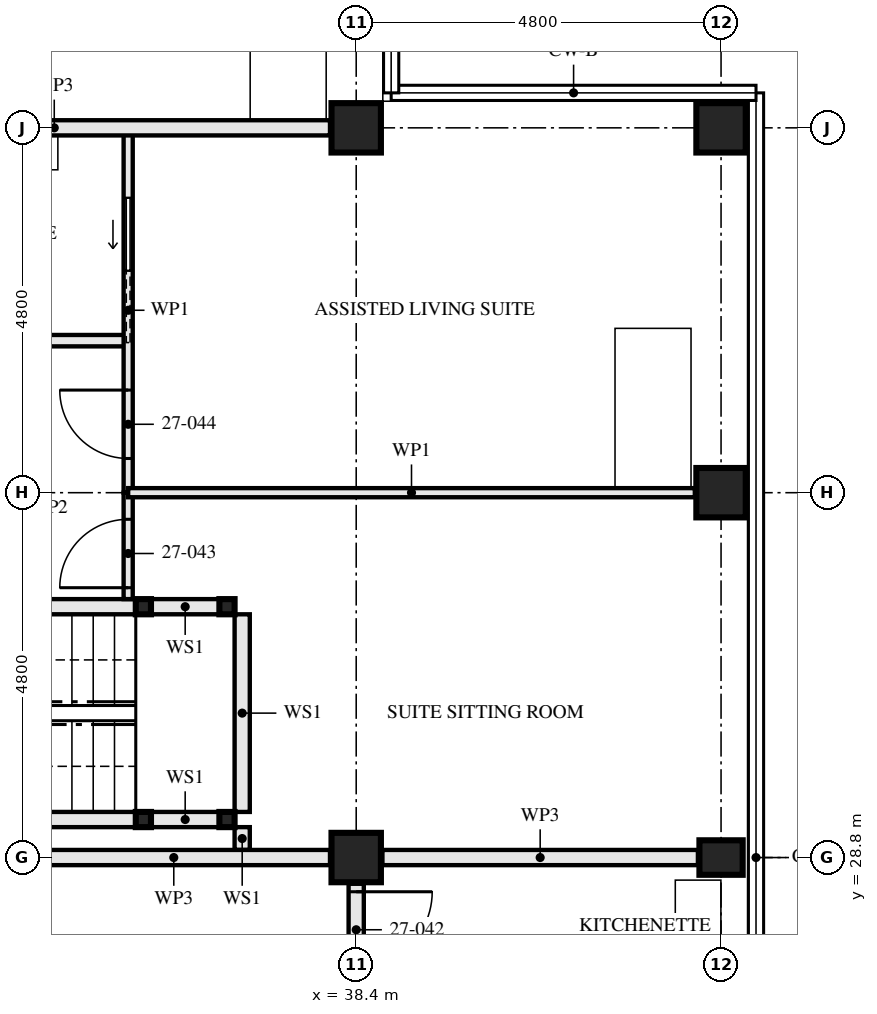
"""IFC4 building model, lengths in metres.
Left out: names, types, materials, properties, quantities, classifications, styles, units other than length and angle.
Written with IfcOpenShell. Run it as: python <this file> out.ifc"""

import sys

from ifc_helpers import new_model, si_unit, direction, frame, frame_2d, origin, origin_2d, place, context, subcontext, project, spatial, rectangle, hollow_rectangle, i_section, extrude, element, fill, save


model = new_model("IFC4")
c1 = context("Model", 3, precision=1e-05, world=origin(), true_north=direction((0.0, 1.0)))
c2 = subcontext(c1, "Body", "Model", "MODEL_VIEW")
j1 = project(units=[si_unit("LENGTHUNIT", "METRE"), si_unit("PLANEANGLEUNIT", "RADIAN")], contexts=[c1])
p1 = place(None, origin())
s1 = spatial("IfcSite", under=j1, at=p1, CompositionType="ELEMENT")
p2 = place(p1, origin())
s2 = spatial("IfcBuilding", under=s1, at=p2, CompositionType="ELEMENT")
p3 = place(p2, frame((0.0, 0.0, 101.5)))
s3 = spatial("IfcBuildingStorey", under=s2, at=p3, CompositionType="ELEMENT", Elevation=101.5)
p4 = place(p3, frame((38.4, 28.8, 0.0), z_axis=(0.0, 0.0, 1.0), x_axis=(0.0, 1.0, 0.0)))
e1 = element("IfcColumn", 1, at=p4, inside=s3, PredefinedType="COLUMN", context=c2, shape_type="SweptSolid", body=[
    extrude(hollow_rectangle(XDim=0.65, YDim=0.65, WallThickness=0.05, at=origin_2d()), origin(), (0.0, 0.0, 1.0), 3.5),
])
p5 = place(p3, frame((38.4, 38.4, 0.0), z_axis=(0.0, 0.0, 1.0), x_axis=(0.0, 1.0, 0.0)))
e2 = element("IfcColumn", 2, at=p5, inside=s3, PredefinedType="COLUMN", context=c2, shape_type="SweptSolid", body=[
    extrude(hollow_rectangle(XDim=0.65, YDim=0.65, WallThickness=0.08, at=origin_2d()), origin(), (0.0, 0.0, 1.0), 3.5),
])
p6 = place(p3, frame((43.2, 28.8, 0.0), z_axis=(0.0, 0.0, 1.0), x_axis=(0.0, 1.0, 0.0)))
e3 = element("IfcColumn", 3, at=p6, inside=s3, PredefinedType="COLUMN", context=c2, shape_type="SweptSolid", body=[
    extrude(i_section(OverallWidth=0.454, OverallDepth=0.569, WebThickness=0.078, FlangeThickness=0.125, FilletRadius=0.015, at=origin_2d()), origin(), (0.0, 0.0, 1.0), 3.5),
])
for number, where, z_axis, x_axis in (
    (4, (43.2, 33.6, 0.0), (0.0, 0.0, 1.0), (1.0, 0.0, 0.0)),
    (5, (43.2, 38.4, 0.0), (0.0, 0.0, 1.0), (0.0, 1.0, 0.0)),
):
    element("IfcColumn", number, at=place(p3, frame(where, z_axis=z_axis, x_axis=x_axis)), inside=s3, PredefinedType="COLUMN", context=c2, shape_type="SweptSolid", body=[
        extrude(hollow_rectangle(XDim=0.65, YDim=0.65, WallThickness=0.08, at=origin_2d()), origin(), (0.0, 0.0, 1.0), 3.5),
    ])
for number, where, z_axis, x_axis in (
    (6, (36.7, 29.3, 0.0), (0.0, 0.0, 1.0), (1.0, 0.0, 0.0)),
    (7, (36.7, 32.1, 0.0), (0.0, 0.0, 1.0), (1.0, 0.0, 0.0)),
    (8, (35.6, 29.3, 0.0), (0.0, 0.0, 1.0), (1.0, 0.0, 0.0)),
    (9, (35.6, 32.1, 0.0), (0.0, 0.0, 1.0), (1.0, 0.0, 0.0)),
):
    element("IfcColumn", number, at=place(p3, frame(where, z_axis=z_axis, x_axis=x_axis)), inside=s3, PredefinedType="COLUMN", context=c2, shape_type="SweptSolid", body=[
        extrude(hollow_rectangle(XDim=0.2, YDim=0.2, WallThickness=0.008, at=origin_2d()), origin(), (0.0, 0.0, 1.0), 3.33),
    ])
p7 = place(p3, frame((38.4, 26.8, 0.0), z_axis=(0.0, 0.0, 1.0), x_axis=(0.0, 1.0, 0.0)))
e10 = element("IfcWall", 10, at=p7, inside=s3, PredefinedType="PARTITIONING", context=c2, shape_type="SweptSolid", body=[
    extrude(rectangle(XDim=1.655, YDim=0.2, at=frame_2d((0.828, 0.0))), origin(), (0.0, 0.0, 1.0), 3.33),
])
p8 = place(p7, frame((0.55, 0.0, 0.0)))
e11 = element("IfcOpeningElement", 11, at=p8, cuts=e10, PredefinedType="OPENING", context=c2, shape_type="SweptSolid", body=[
    extrude(rectangle(XDim=1.0, YDim=2.1, at=frame_2d((0.5, 1.05))), frame((0.0, 0.111, 0.0), z_axis=(0.0, -1.0, 0.0), x_axis=(1.0, 0.0, 0.0)), (0.0, 0.0, 1.0), 0.221),
])
p9 = place(p3, frame((36.6, 29.3, 0.0), z_axis=(0.0, 0.0, 1.0), x_axis=(-1.0, 0.0, 0.0)))
e12 = element("IfcWall", 12, at=p9, inside=s3, PredefinedType="SOLIDWALL", context=c2, shape_type="SweptSolid", body=[
    extrude(rectangle(XDim=0.9, YDim=0.2, at=frame_2d((0.45, 0.0))), origin(), (0.0, 0.0, 1.0), 2.99),
])
p10 = place(p3, frame((35.5, 29.3, 0.0), z_axis=(0.0, 0.0, 1.0), x_axis=(-1.0, 0.0, 0.0)))
e13 = element("IfcWall", 13, at=p10, inside=s3, PredefinedType="SOLIDWALL", context=c2, shape_type="SweptSolid", body=[
    extrude(rectangle(XDim=4.7, YDim=0.2, at=frame_2d((2.35, 0.0))), origin(), (0.0, 0.0, 1.0), 2.99),
])
p11 = place(p3, frame((36.6, 32.1, 0.0), z_axis=(0.0, 0.0, 1.0), x_axis=(-1.0, 0.0, 0.0)))
e14 = element("IfcWall", 14, at=p11, inside=s3, PredefinedType="SOLIDWALL", context=c2, shape_type="SweptSolid", body=[
    extrude(rectangle(XDim=0.9, YDim=0.2, at=frame_2d((0.45, 0.0))), origin(), (0.0, 0.0, 1.0), 2.99),
])
p12 = place(p3, frame((35.5, 32.1, 0.0), z_axis=(0.0, 0.0, 1.0), x_axis=(-1.0, 0.0, 0.0)))
e15 = element("IfcWall", 15, at=p12, inside=s3, PredefinedType="SOLIDWALL", context=c2, shape_type="SweptSolid", body=[
    extrude(rectangle(XDim=4.7, YDim=0.2, at=frame_2d((2.35, 0.0))), origin(), (0.0, 0.0, 1.0), 2.99),
])
p13 = place(p3, frame((36.9, 28.9, 0.0), z_axis=(0.0, 0.0, 1.0), x_axis=(0.0, 1.0, 0.0)))
e16 = element("IfcWall", 16, at=p13, inside=s3, PredefinedType="SOLIDWALL", context=c2, shape_type="SweptSolid", body=[
    extrude(rectangle(XDim=0.3, YDim=0.2, at=frame_2d((0.15, 0.0))), origin(), (0.0, 0.0, 1.0), 3.33),
])
p14 = place(p3, frame((36.9, 29.4, 0.0), z_axis=(0.0, 0.0, 1.0), x_axis=(0.0, 1.0, 0.0)))
e17 = element("IfcWall", 17, at=p14, inside=s3, PredefinedType="SOLIDWALL", context=c2, shape_type="SweptSolid", body=[
    extrude(rectangle(XDim=2.6, YDim=0.2, at=frame_2d((1.3, 0.0))), origin(), (0.0, 0.0, 1.0), 3.33),
])
p15 = place(p3, frame((35.4, 35.6, 0.0), z_axis=(0.0, 0.0, 1.0), x_axis=(-1.0, 0.0, 0.0)))
e18 = element("IfcWall", 18, at=p15, inside=s3, PredefinedType="PARTITIONING", context=c2, shape_type="SweptSolid", body=[
    extrude(rectangle(XDim=3.0, YDim=0.15, at=frame_2d((1.5, 0.0))), origin(), (0.0, 0.0, 1.0), 3.33),
])
p16 = place(p3, frame((35.4, 32.2, 0.0), z_axis=(0.0, 0.0, 1.0), x_axis=(0.0, 1.0, 0.0)))
e19 = element("IfcWall", 19, at=p16, inside=s3, PredefinedType="PARTITIONING", context=c2, shape_type="SweptSolid", body=[
    extrude(rectangle(XDim=1.4, YDim=0.12, at=frame_2d((0.7, 0.0))), origin(), (0.0, 0.0, 1.0), 3.33),
])
p17 = place(p16, frame((0.15, 0.0, 0.0)))
e20 = element("IfcOpeningElement", 20, at=p17, cuts=e19, PredefinedType="OPENING", context=c2, shape_type="SweptSolid", body=[
    extrude(rectangle(XDim=0.9, YDim=2.1, at=frame_2d((0.45, 1.05))), frame((0.0, 0.071, 0.0), z_axis=(0.0, -1.0, 0.0), x_axis=(1.0, 0.0, 0.0)), (0.0, 0.0, 1.0), 0.141),
])
p18 = place(p3, frame((35.4, 33.6, 0.0), z_axis=(0.0, 0.0, 1.0), x_axis=(0.0, 1.0, 0.0)))
e21 = element("IfcWall", 21, at=p18, inside=s3, PredefinedType="PARTITIONING", context=c2, shape_type="SweptSolid", body=[
    extrude(rectangle(XDim=4.8, YDim=0.12, at=frame_2d((2.4, 0.0))), origin(), (0.0, 0.0, 1.0), 3.33),
])
p19 = place(p18, frame((0.45, 0.0, 0.0)))
e22 = element("IfcOpeningElement", 22, at=p19, cuts=e21, PredefinedType="OPENING", context=c2, shape_type="SweptSolid", body=[
    extrude(rectangle(XDim=0.9, YDim=2.1, at=frame_2d((0.45, 1.05))), frame((0.0, 0.071, 0.0), z_axis=(0.0, -1.0, 0.0), x_axis=(1.0, 0.0, 0.0)), (0.0, 0.0, 1.0), 0.141),
])
p20 = place(p18, frame((2.925, 0.0, 0.0)))
e23 = element("IfcOpeningElement", 23, at=p20, cuts=e21, PredefinedType="OPENING", context=c2, shape_type="SweptSolid", body=[
    extrude(rectangle(XDim=0.95, YDim=2.1, at=frame_2d((0.475, 1.05))), frame((0.0, 0.071, 0.0), z_axis=(0.0, -1.0, 0.0), x_axis=(1.0, 0.0, 0.0)), (0.0, 0.0, 1.0), 0.141),
])
p21 = place(p3, frame((42.855, 33.6, 0.0), z_axis=(0.0, 0.0, 1.0), x_axis=(-1.0, 0.0, 0.0)))
e24 = element("IfcWall", 24, at=p21, inside=s3, PredefinedType="PARTITIONING", context=c2, shape_type="SweptSolid", body=[
    extrude(rectangle(XDim=7.455, YDim=0.12, at=frame_2d((3.728, 0.0))), origin(), (0.0, 0.0, 1.0), 2.55),
])
p22 = place(p3, frame((38.055, 38.4, 0.0), z_axis=(0.0, 0.0, 1.0), x_axis=(-1.0, 0.0, 0.0)))
e25 = element("IfcWall", 25, at=p22, inside=s3, PredefinedType="PARTITIONING", context=c2, shape_type="SweptSolid", body=[
    extrude(rectangle(XDim=7.255, YDim=0.2, at=frame_2d((3.627, 0.0))), origin(), (0.0, 0.0, 1.0), 2.55),
])
p23 = place(p3, frame((42.896, 28.8, 0.0), z_axis=(0.0, 0.0, 1.0), x_axis=(-1.0, 0.0, 0.0)))
e26 = element("IfcWall", 26, at=p23, inside=s3, PredefinedType="PARTITIONING", context=c2, shape_type="SweptSolid", body=[
    extrude(rectangle(XDim=4.15, YDim=0.2, at=frame_2d((2.075, 0.0))), origin(), (0.0, 0.0, 1.0), 2.32),
])
p24 = place(p3, frame((38.055, 28.8, 0.0), z_axis=(0.0, 0.0, 1.0), x_axis=(-1.0, 0.0, 0.0)))
e27 = element("IfcWall", 27, at=p24, inside=s3, PredefinedType="PARTITIONING", context=c2, shape_type="SweptSolid", body=[
    extrude(rectangle(XDim=4.11, YDim=0.2, at=frame_2d((2.055, 0.0))), origin(), (0.0, 0.0, 1.0), 2.32),
])
p25 = place(p8, frame((1.0, 0.0, 0.0), z_axis=(0.0, 0.0, 1.0), x_axis=(-1.0, 0.0, 0.0)))
e28 = element("IfcDoor", 28, at=p25, inside=s3, OperationType="SINGLE_SWING_RIGHT", PredefinedType="DOOR", context=c2, shape_type="SweptSolid", body=[
    extrude(rectangle(XDim=1.0, YDim=2.1, at=frame_2d((0.5, 1.05))), frame((0.0, 0.027, 0.0), z_axis=(0.0, -1.0, 0.0), x_axis=(1.0, 0.0, 0.0)), (0.0, 0.0, 1.0), 0.054),
])
fill(e11, e28)
p26 = place(p17, origin())
e29 = element("IfcDoor", 29, at=p26, inside=s3, OperationType="SINGLE_SWING_RIGHT", PredefinedType="DOOR", context=c2, shape_type="SweptSolid", body=[
    extrude(rectangle(XDim=0.9, YDim=2.1, at=frame_2d((0.45, 1.05))), frame((0.0, 0.022, 0.0), z_axis=(0.0, -1.0, 0.0), x_axis=(1.0, 0.0, 0.0)), (0.0, 0.0, 1.0), 0.044),
])
fill(e20, e29)
p27 = place(p19, origin())
e30 = element("IfcDoor", 30, at=p27, inside=s3, OperationType="SINGLE_SWING_LEFT", PredefinedType="DOOR", context=c2, shape_type="SweptSolid", body=[
    extrude(rectangle(XDim=0.9, YDim=2.1, at=frame_2d((0.45, 1.05))), frame((0.0, 0.022, 0.0), z_axis=(0.0, -1.0, 0.0), x_axis=(1.0, 0.0, 0.0)), (0.0, 0.0, 1.0), 0.044),
])
fill(e22, e30)
p28 = place(p20, origin())
e31 = element("IfcDoor", 31, at=p28, inside=s3, OperationType="SLIDING_TO_RIGHT", PredefinedType="DOOR", context=c2, shape_type="SweptSolid", body=[
    extrude(rectangle(XDim=0.95, YDim=2.1, at=frame_2d((0.475, 1.05))), frame((0.0, 0.022, 0.0), z_axis=(0.0, -1.0, 0.0), x_axis=(1.0, 0.0, 0.0)), (0.0, 0.0, 1.0), 0.044),
])
fill(e23, e31)
save(model, sys.argv[1])
